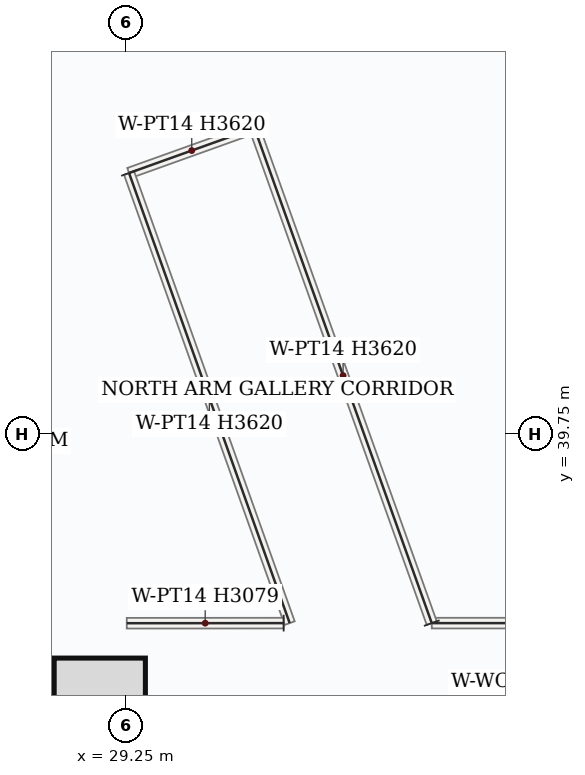
"""IFC4 building model, lengths in metres.
Left out: names, types, materials, properties, quantities, classifications, styles, units other than length and angle.
Written with IfcOpenShell. Run it as: python <this file> out.ifc"""

import sys

from ifc_helpers import new_model, si_unit, direction, frame, frame_2d, origin, origin_2d, place, context, subcontext, project, spatial, rectangle, extrude, source, transform, mapped, element, save


model = new_model("IFC4")
c1 = context("Model", 3, precision=1e-05, world=origin(), true_north=direction((0.0, 1.0)))
c2 = subcontext(c1, "Body", "Model", "MODEL_VIEW")
j1 = project(units=[si_unit("LENGTHUNIT", "METRE"), si_unit("PLANEANGLEUNIT", "RADIAN")], contexts=[c1])
p1 = place(None, origin())
s1 = spatial("IfcSite", under=j1, at=p1, CompositionType="ELEMENT")
p2 = place(p1, origin())
s2 = spatial("IfcBuilding", under=s1, at=p2, CompositionType="ELEMENT")
p3 = place(p2, frame((0.0, 0.0, 221.4)))
s3 = spatial("IfcBuildingStorey", under=s2, at=p3, CompositionType="ELEMENT", Elevation=221.4)
p4 = place(p3, frame((29.0, 28.05, 0.0), z_axis=(0.0, 0.0, 1.0), x_axis=(0.0, 1.0, 0.0)))
e1 = element("IfcWall", 1, at=p4, inside=s3, PredefinedType="SHEAR", context=c2, shape_type="SweptSolid", body=[
    extrude(rectangle(XDim=8.55, YDim=0.5, at=frame_2d((4.275, 0.0))), origin(), (0.0, 0.0, 1.0), 3.62),
])
p5 = place(p4, frame((1.5, 0.0, 0.0)))
e2 = element("IfcOpeningElement", 2, at=p5, cuts=e1, PredefinedType="OPENING", context=c2, shape_type="SweptSolid", body=[
    extrude(rectangle(XDim=1.1, YDim=2.2, at=frame_2d((0.55, 1.1))), frame((0.0, 0.26, 0.0), z_axis=(0.0, -1.0, 0.0), x_axis=(1.0, 0.0, 0.0)), (0.0, 0.0, 1.0), 0.52),
])
m1 = source(origin(), c2, "Body", "SweptSolid", [
    extrude(rectangle(XDim=7.0, YDim=0.5, at=frame_2d((3.5, 0.0))), origin(), (0.0, 0.0, 1.0), 3.62),
])
p6 = place(p3, frame((21.75, 36.35, 0.0), z_axis=(0.0, 0.0, 1.0), x_axis=(1.0, 0.0, 0.0)))
e3 = element("IfcWall", 3, at=p6, inside=s3, PredefinedType="SHEAR", context=c2, shape_type="MappedRepresentation", body=[
    mapped(m1, transform((0.0, 0.0, 0.0), x_axis=(1.0, 0.0, 0.0), y_axis=(0.0, 1.0, 0.0), z_axis=(0.0, 0.0, 1.0), scale=1.0)),
])
m2 = source(origin(), c2, "Body", "SweptSolid", [
    extrude(rectangle(XDim=1.2, YDim=1.2, at=origin_2d()), origin(), (0.0, 0.0, 1.0), 3.9),
])
p7 = place(p3, frame((28.9, 36.2, 0.0), z_axis=(0.0, 0.0, 1.0), x_axis=(1.0, 0.0, 0.0)))
e4 = element("IfcColumn", 4, at=p7, inside=s3, PredefinedType="COLUMN", context=c2, shape_type="MappedRepresentation", body=[
    mapped(m2, transform((0.0, 0.0, 0.0), x_axis=(1.0, 0.0, 0.0), y_axis=(0.0, 1.0, 0.0), z_axis=(0.0, 0.0, 1.0), scale=1.0)),
])
p8 = place(p3, frame((40.841, 37.26, 0.0), z_axis=(0.0, 0.0, 1.0), x_axis=(-1.0, 0.0, 0.0)))
e5 = element("IfcWall", 5, at=p8, inside=s3, PredefinedType="PARTITIONING", context=c2, shape_type="SweptSolid", body=[
    extrude(rectangle(XDim=7.573, YDim=0.14, at=frame_2d((3.787, 0.0))), origin(), (0.0, 0.0, 1.0), 3.62),
])
p9 = place(p8, frame((4.305, 0.0, 0.0)))
e6 = element("IfcOpeningElement", 6, at=p9, cuts=e5, PredefinedType="OPENING", context=c2, shape_type="SweptSolid", body=[
    extrude(rectangle(XDim=0.95, YDim=2.15, at=frame_2d((0.475, 1.075))), frame((0.0, 0.08, 0.0), z_axis=(0.0, -1.0, 0.0), x_axis=(1.0, 0.0, 0.0)), (0.0, 0.0, 1.0), 0.16),
])
m3 = source(origin(), c2, "Body", "SweptSolid", [
    extrude(rectangle(XDim=6.918, YDim=0.14, at=frame_2d((3.459, 0.0))), origin(), (0.0, 0.0, 1.0), 3.62),
])
p10 = place(p3, frame((33.268, 37.26, 0.0), z_axis=(0.0, 0.0, 1.0), x_axis=(-0.337208154994, 0.94143011435, 0.0)))
e7 = element("IfcWall", 7, at=p10, inside=s3, PredefinedType="PARTITIONING", context=c2, shape_type="MappedRepresentation", body=[
    mapped(m3, transform((0.0, 0.0, 0.0), x_axis=(1.0, 0.0, 0.0), y_axis=(0.0, 1.0, 0.0), z_axis=(0.0, 0.0, 1.0), scale=1.0)),
])
m4 = source(origin(), c2, "Body", "SweptSolid", [
    extrude(rectangle(XDim=1.753, YDim=0.14, at=frame_2d((0.876, 0.0))), origin(), (0.0, 0.0, 1.0), 3.62),
])
p11 = place(p3, frame((30.935, 43.773, 0.0), z_axis=(0.0, 0.0, 1.0), x_axis=(-0.941413691232, -0.337254002142, 0.0)))
e8 = element("IfcWall", 8, at=p11, inside=s3, PredefinedType="PARTITIONING", context=c2, shape_type="MappedRepresentation", body=[
    mapped(m4, transform((0.0, 0.0, 0.0), x_axis=(1.0, 0.0, 0.0), y_axis=(0.0, 1.0, 0.0), z_axis=(0.0, 0.0, 1.0), scale=1.0)),
])
m5 = source(origin(), c2, "Body", "SweptSolid", [
    extrude(rectangle(XDim=6.288, YDim=0.14, at=frame_2d((3.144, 0.0))), origin(), (0.0, 0.0, 1.0), 3.62),
])
p12 = place(p3, frame((29.285, 43.182, 0.0), z_axis=(0.0, 0.0, 1.0), x_axis=(0.336146986569, -0.941809536701, 0.0)))
e9 = element("IfcWall", 9, at=p12, inside=s3, PredefinedType="PARTITIONING", context=c2, shape_type="MappedRepresentation", body=[
    mapped(m5, transform((0.0, 0.0, 0.0), x_axis=(1.0, 0.0, 0.0), y_axis=(0.0, 1.0, 0.0), z_axis=(0.0, 0.0, 1.0), scale=1.0)),
])
m6 = source(origin(), c2, "Body", "SweptSolid", [
    extrude(rectangle(XDim=2.064, YDim=0.14, at=frame_2d((1.032, 0.0))), origin(), (0.0, 0.0, 1.0), 3.079),
])
p13 = place(p3, frame((31.319, 37.26, 0.0), z_axis=(0.0, 0.0, 1.0), x_axis=(-0.999999825102, -0.000591435903, 0.0)))
e10 = element("IfcWall", 10, at=p13, inside=s3, PredefinedType="PARTITIONING", context=c2, shape_type="MappedRepresentation", body=[
    mapped(m6, transform((0.0, 0.0, 0.0), x_axis=(1.0, 0.0, 0.0), y_axis=(0.0, 1.0, 0.0), z_axis=(0.0, 0.0, 1.0), scale=1.0)),
])
save(model, sys.argv[1])
